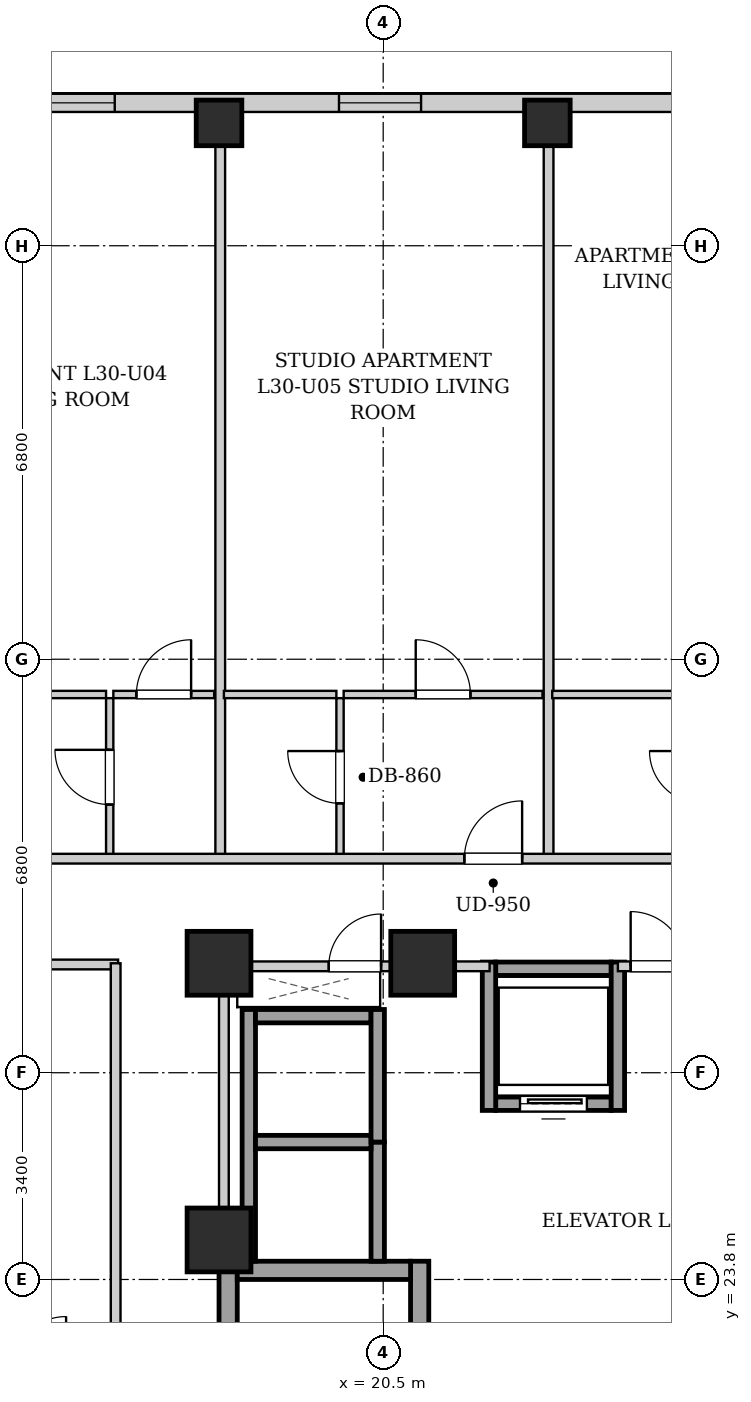
"""IFC4 building model, lengths in metres.
Left out: names, types, materials, properties, quantities, classifications, styles, units other than length and angle.
Written with IfcOpenShell. Run it as: python <this file> out.ifc"""

import sys

from ifc_helpers import new_model, si_unit, direction, frame, frame_2d, origin, origin_2d, place, context, subcontext, project, spatial, rectangle, extrude, element, fill, save


model = new_model("IFC4")
c1 = context("Model", 3, precision=1e-05, world=origin(), true_north=direction((0.0, 1.0)))
c2 = subcontext(c1, "Body", "Model", "MODEL_VIEW")
j1 = project(units=[si_unit("LENGTHUNIT", "METRE"), si_unit("PLANEANGLEUNIT", "RADIAN")], contexts=[c1])
p1 = place(None, origin())
s1 = spatial("IfcSite", under=j1, at=p1, CompositionType="ELEMENT")
p2 = place(p1, origin())
s2 = spatial("IfcBuilding", under=s1, at=p2, CompositionType="ELEMENT")
p3 = place(p2, frame((0.0, 0.0, 107.1)))
s3 = spatial("IfcBuildingStorey", under=s2, at=p3, CompositionType="ELEMENT", Elevation=107.1)
for number, where, z_axis, x_axis in (
    (1, (17.8, 42.82, 0.0), (0.0, 0.0, 1.0), (1.0, 0.0, 0.0)),
    (2, (23.2, 42.82, 0.0), (0.0, 0.0, 1.0), (1.0, 0.0, 0.0)),
):
    element("IfcColumn", number, at=place(p3, frame(where, z_axis=z_axis, x_axis=x_axis)), inside=s3, PredefinedType="COLUMN", context=c2, shape_type="SweptSolid", body=[
        extrude(rectangle(XDim=0.75, YDim=0.75, at=origin_2d()), origin(), (0.0, 0.0, 1.0), 3.2),
    ])
for number, where, z_axis, x_axis in (
    (3, (17.8, 29.0, 0.0), (0.0, 0.0, 1.0), (1.0, 0.0, 0.0)),
    (4, (21.15, 29.0, 0.0), (0.0, 0.0, 1.0), (1.0, 0.0, 0.0)),
    (5, (17.8, 24.45, 0.0), (0.0, 0.0, 1.0), (1.0, 0.0, 0.0)),
):
    element("IfcColumn", number, at=place(p3, frame(where, z_axis=z_axis, x_axis=x_axis)), inside=s3, PredefinedType="COLUMN", context=c2, shape_type="SweptSolid", body=[
        extrude(rectangle(XDim=1.05, YDim=1.05, at=origin_2d()), origin(), (0.0, 0.0, 1.0), 3.2),
    ])
p4 = place(p3, frame((10.0, 43.15, 0.0), z_axis=(0.0, 0.0, 1.0), x_axis=(1.0, 0.0, 0.0)))
e6 = element("IfcWall", 6, at=p4, inside=s3, PredefinedType="SOLIDWALL", context=c2, shape_type="SweptSolid", body=[
    extrude(rectangle(XDim=23.15, YDim=0.3, at=frame_2d((11.575, 0.0))), origin(), (0.0, 0.0, 1.0), 2.94),
])
p5 = place(p4, frame((4.735, 0.0, 0.55)))
e7 = element("IfcOpeningElement", 7, at=p5, cuts=e6, PredefinedType="OPENING", context=c2, shape_type="SweptSolid", body=[
    extrude(rectangle(XDim=1.35, YDim=1.2, at=frame_2d((0.675, 0.6))), frame((0.0, 0.16, 0.0), z_axis=(0.0, -1.0, 0.0), x_axis=(1.0, 0.0, 0.0)), (0.0, 0.0, 1.0), 0.32),
])
p6 = place(p4, frame((1.27, 0.0, 0.55)))
e8 = element("IfcOpeningElement", 8, at=p6, cuts=e6, PredefinedType="OPENING", context=c2, shape_type="SweptSolid", body=[
    extrude(rectangle(XDim=1.35, YDim=1.2, at=frame_2d((0.675, 0.6))), frame((0.0, 0.16, 0.0), z_axis=(0.0, -1.0, 0.0), x_axis=(1.0, 0.0, 0.0)), (0.0, 0.0, 1.0), 0.32),
])
p7 = place(p4, frame((9.773, 0.0, 0.55)))
e9 = element("IfcOpeningElement", 9, at=p7, cuts=e6, PredefinedType="OPENING", context=c2, shape_type="SweptSolid", body=[
    extrude(rectangle(XDim=1.35, YDim=1.2, at=frame_2d((0.675, 0.6))), frame((0.0, 0.16, 0.0), z_axis=(0.0, -1.0, 0.0), x_axis=(1.0, 0.0, 0.0)), (0.0, 0.0, 1.0), 0.32),
])
p8 = place(p4, frame((17.5, 0.0, 0.55)))
e10 = element("IfcOpeningElement", 10, at=p8, cuts=e6, PredefinedType="OPENING", context=c2, shape_type="SweptSolid", body=[
    extrude(rectangle(XDim=0.85, YDim=1.2, at=frame_2d((0.425, 0.6))), frame((0.0, 0.16, 0.0), z_axis=(0.0, -1.0, 0.0), x_axis=(1.0, 0.0, 0.0)), (0.0, 0.0, 1.0), 0.32),
])
p9 = place(p4, frame((19.393, 0.0, 0.55)))
e11 = element("IfcOpeningElement", 11, at=p9, cuts=e6, PredefinedType="OPENING", context=c2, shape_type="SweptSolid", body=[
    extrude(rectangle(XDim=1.35, YDim=1.2, at=frame_2d((0.675, 0.6))), frame((0.0, 0.16, 0.0), z_axis=(0.0, -1.0, 0.0), x_axis=(1.0, 0.0, 0.0)), (0.0, 0.0, 1.0), 0.32),
])
for number, where, z_axis, x_axis in (
    (12, (17.95, 15.1, 0.0), (0.0, 0.0, 1.0), (0.0, 1.0, 0.0)),
    (13, (21.1, 15.1, 0.0), (0.0, 0.0, 1.0), (0.0, 1.0, 0.0)),
):
    element("IfcWall", number, at=place(p3, frame(where, z_axis=z_axis, x_axis=x_axis)), inside=s3, PredefinedType="SHEAR", context=c2, shape_type="SweptSolid", body=[
        extrude(rectangle(XDim=9.0, YDim=0.3, at=frame_2d((4.5, 0.0))), origin(), (0.0, 0.0, 1.0), 2.94),
    ])
p10 = place(p3, frame((18.1, 23.95, 0.0), z_axis=(0.0, 0.0, 1.0), x_axis=(1.0, 0.0, 0.0)))
e14 = element("IfcWall", 14, at=p10, inside=s3, PredefinedType="SHEAR", context=c2, shape_type="SweptSolid", body=[
    extrude(rectangle(XDim=2.85, YDim=0.3, at=frame_2d((1.425, 0.0))), origin(), (0.0, 0.0, 1.0), 2.94),
])
p11 = place(p3, frame((22.35, 26.69, 0.0), z_axis=(0.0, 0.0, 1.0), x_axis=(1.0, 0.0, 0.0)))
e15 = element("IfcWall", 15, at=p11, inside=s3, PredefinedType="SHEAR", context=c2, shape_type="SweptSolid", body=[
    extrude(rectangle(XDim=1.9, YDim=0.22, at=frame_2d((0.95, 0.0))), origin(), (0.0, 0.0, 1.0), 2.94),
])
p12 = place(p11, frame((0.4, 0.0, 0.0)))
e16 = element("IfcOpeningElement", 16, at=p12, cuts=e15, PredefinedType="OPENING", context=c2, shape_type="SweptSolid", body=[
    extrude(rectangle(XDim=1.1, YDim=2.15, at=frame_2d((0.55, 1.075))), frame((0.0, 0.12, 0.0), z_axis=(0.0, -1.0, 0.0), x_axis=(1.0, 0.0, 0.0)), (0.0, 0.0, 1.0), 0.24),
])
p13 = place(p3, frame((22.35, 28.91, 0.0), z_axis=(0.0, 0.0, 1.0), x_axis=(1.0, 0.0, 0.0)))
e17 = element("IfcWall", 17, at=p13, inside=s3, PredefinedType="SHEAR", context=c2, shape_type="SweptSolid", body=[
    extrude(rectangle(XDim=1.9, YDim=0.22, at=frame_2d((0.95, 0.0))), origin(), (0.0, 0.0, 1.0), 2.94),
])
for number, where, z_axis, x_axis in (
    (18, (22.24, 26.58, 0.0), (0.0, 0.0, 1.0), (0.0, 1.0, 0.0)),
    (19, (24.36, 26.58, 0.0), (0.0, 0.0, 1.0), (0.0, 1.0, 0.0)),
):
    element("IfcWall", number, at=place(p3, frame(where, z_axis=z_axis, x_axis=x_axis)), inside=s3, PredefinedType="SHEAR", context=c2, shape_type="SweptSolid", body=[
        extrude(rectangle(XDim=2.44, YDim=0.22, at=frame_2d((1.22, 0.0))), origin(), (0.0, 0.0, 1.0), 2.94),
    ])
p14 = place(p3, frame((18.29, 24.1, 0.0), z_axis=(0.0, 0.0, 1.0), x_axis=(0.0, 1.0, 0.0)))
e20 = element("IfcWall", 20, at=p14, inside=s3, PredefinedType="SHEAR", context=c2, shape_type="SweptSolid", body=[
    extrude(rectangle(XDim=4.14, YDim=0.22, at=frame_2d((2.07, 0.0))), origin(), (0.0, 0.0, 1.0), 2.94),
])
p15 = place(p3, frame((20.41, 24.1, 0.0), z_axis=(0.0, 0.0, 1.0), x_axis=(0.0, 1.0, 0.0)))
e21 = element("IfcWall", 21, at=p15, inside=s3, PredefinedType="SHEAR", context=c2, shape_type="SweptSolid", body=[
    extrude(rectangle(XDim=1.96, YDim=0.22, at=frame_2d((0.98, 0.0))), origin(), (0.0, 0.0, 1.0), 2.94),
])
for number, where, z_axis, x_axis in (
    (22, (18.4, 26.06, 0.0), (0.0, 0.0, 1.0), (1.0, 0.0, 0.0)),
    (23, (18.4, 28.13, 0.0), (0.0, 0.0, 1.0), (1.0, 0.0, 0.0)),
):
    element("IfcWall", number, at=place(p3, frame(where, z_axis=z_axis, x_axis=x_axis)), inside=s3, PredefinedType="SHEAR", context=c2, shape_type="SweptSolid", body=[
        extrude(rectangle(XDim=1.9, YDim=0.22, at=frame_2d((0.95, 0.0))), origin(), (0.0, 0.0, 1.0), 2.94),
    ])
p16 = place(p3, frame((20.41, 26.06, 0.0), z_axis=(0.0, 0.0, 1.0), x_axis=(0.0, 1.0, 0.0)))
e24 = element("IfcWall", 24, at=p16, inside=s3, PredefinedType="SHEAR", context=c2, shape_type="SweptSolid", body=[
    extrude(rectangle(XDim=2.18, YDim=0.22, at=frame_2d((1.09, 0.0))), origin(), (0.0, 0.0, 1.0), 2.94),
])
p17 = place(p3, frame((17.88, 24.12, 0.0), z_axis=(0.0, 0.0, 1.0), x_axis=(0.0, 1.0, 0.0)))
e25 = element("IfcWall", 25, at=p17, inside=s3, PredefinedType="PARTITIONING", context=c2, shape_type="SweptSolid", body=[
    extrude(rectangle(XDim=4.76, YDim=0.16, at=frame_2d((2.38, 0.0))), origin(), (0.0, 0.0, 1.0), 2.275),
])
p18 = place(p3, frame((24.36, 28.95, 0.0), z_axis=(0.0, 0.0, 1.0), x_axis=(1.0, 0.0, 0.0)))
e26 = element("IfcWall", 26, at=p18, inside=s3, PredefinedType="PARTITIONING", context=c2, shape_type="SweptSolid", body=[
    extrude(rectangle(XDim=1.32, YDim=0.16, at=frame_2d((0.66, 0.0))), origin(), (0.0, 0.0, 1.0), 2.313),
])
p19 = place(p18, frame((0.21, 0.0, 0.0)))
e27 = element("IfcOpeningElement", 27, at=p19, cuts=e26, PredefinedType="OPENING", context=c2, shape_type="SweptSolid", body=[
    extrude(rectangle(XDim=0.9, YDim=2.05, at=frame_2d((0.45, 1.025))), frame((0.0, 0.09, 0.0), z_axis=(0.0, -1.0, 0.0), x_axis=(1.0, 0.0, 0.0)), (0.0, 0.0, 1.0), 0.18),
])
p20 = place(p3, frame((17.96, 28.95, 0.0), z_axis=(0.0, 0.0, 1.0), x_axis=(1.0, 0.0, 0.0)))
e28 = element("IfcWall", 28, at=p20, inside=s3, PredefinedType="PARTITIONING", context=c2, shape_type="SweptSolid", body=[
    extrude(rectangle(XDim=4.29, YDim=0.16, at=frame_2d((2.145, 0.0))), origin(), (0.0, 0.0, 1.0), 2.313),
])
p21 = place(p20, frame((1.645, 0.0, 0.0)))
e29 = element("IfcOpeningElement", 29, at=p21, cuts=e28, PredefinedType="OPENING", context=c2, shape_type="SweptSolid", body=[
    extrude(rectangle(XDim=0.86, YDim=2.05, at=frame_2d((0.43, 1.025))), frame((0.0, 0.09, 0.0), z_axis=(0.0, -1.0, 0.0), x_axis=(1.0, 0.0, 0.0)), (0.0, 0.0, 1.0), 0.18),
])
p22 = place(p3, frame((7.78, 28.98, 0.0), z_axis=(0.0, 0.0, 1.0), x_axis=(1.0, 0.0, 0.0)))
e30 = element("IfcWall", 30, at=p22, inside=s3, PredefinedType="PARTITIONING", context=c2, shape_type="SweptSolid", body=[
    extrude(rectangle(XDim=8.36, YDim=0.16, at=frame_2d((4.18, 0.0))), origin(), (0.0, 0.0, 1.0), 2.313),
])
p23 = place(p3, frame((16.002, 30.76, 0.0), z_axis=(0.0, 0.0, 1.0), x_axis=(0.0, 1.0, 0.0)))
e31 = element("IfcWall", 31, at=p23, inside=s3, PredefinedType="PARTITIONING", context=c2, shape_type="SweptSolid", body=[
    extrude(rectangle(XDim=2.6, YDim=0.12, at=frame_2d((1.3, 0.0))), origin(), (0.0, 0.0, 1.0), 2.94),
])
p24 = place(p23, frame((0.85, 0.0, 0.0)))
e32 = element("IfcOpeningElement", 32, at=p24, cuts=e31, PredefinedType="OPENING", context=c2, shape_type="SweptSolid", body=[
    extrude(rectangle(XDim=0.9, YDim=2.05, at=frame_2d((0.45, 1.025))), frame((0.0, 0.07, 0.0), z_axis=(0.0, -1.0, 0.0), x_axis=(1.0, 0.0, 0.0)), (0.0, 0.0, 1.0), 0.14),
])
p25 = place(p3, frame((12.492, 33.42, 0.0), z_axis=(0.0, 0.0, 1.0), x_axis=(1.0, 0.0, 0.0)))
e33 = element("IfcWall", 33, at=p25, inside=s3, PredefinedType="PARTITIONING", context=c2, shape_type="SweptSolid", body=[
    extrude(rectangle(XDim=3.45, YDim=0.12, at=frame_2d((1.725, 0.0))), origin(), (0.0, 0.0, 1.0), 2.94),
])
p26 = place(p25, frame((1.275, 0.0, 0.0)))
e34 = element("IfcOpeningElement", 34, at=p26, cuts=e33, PredefinedType="OPENING", context=c2, shape_type="SweptSolid", body=[
    extrude(rectangle(XDim=0.9, YDim=2.05, at=frame_2d((0.45, 1.025))), frame((0.0, 0.07, 0.0), z_axis=(0.0, -1.0, 0.0), x_axis=(1.0, 0.0, 0.0)), (0.0, 0.0, 1.0), 0.14),
])
p27 = place(p3, frame((16.062, 33.42, 0.0), z_axis=(0.0, 0.0, 1.0), x_axis=(1.0, 0.0, 0.0)))
e35 = element("IfcWall", 35, at=p27, inside=s3, PredefinedType="PARTITIONING", context=c2, shape_type="SweptSolid", body=[
    extrude(rectangle(XDim=1.658, YDim=0.12, at=frame_2d((0.829, 0.0))), origin(), (0.0, 0.0, 1.0), 2.94),
])
p28 = place(p27, frame((0.379, 0.0, 0.0)))
e36 = element("IfcOpeningElement", 36, at=p28, cuts=e35, PredefinedType="OPENING", context=c2, shape_type="SweptSolid", body=[
    extrude(rectangle(XDim=0.9, YDim=2.05, at=frame_2d((0.45, 1.025))), frame((0.0, 0.07, 0.0), z_axis=(0.0, -1.0, 0.0), x_axis=(1.0, 0.0, 0.0)), (0.0, 0.0, 1.0), 0.14),
])
p29 = place(p3, frame((17.82, 30.76, 0.0), z_axis=(0.0, 0.0, 1.0), x_axis=(0.0, 1.0, 0.0)))
e37 = element("IfcWall", 37, at=p29, inside=s3, PredefinedType="PARTITIONING", context=c2, shape_type="SweptSolid", body=[
    extrude(rectangle(XDim=12.26, YDim=0.16, at=frame_2d((6.13, 0.0))), origin(), (0.0, 0.0, 1.0), 2.313),
])
p30 = place(p3, frame((19.79, 30.76, 0.0), z_axis=(0.0, 0.0, 1.0), x_axis=(0.0, 1.0, 0.0)))
e38 = element("IfcWall", 38, at=p30, inside=s3, PredefinedType="PARTITIONING", context=c2, shape_type="SweptSolid", body=[
    extrude(rectangle(XDim=2.6, YDim=0.12, at=frame_2d((1.3, 0.0))), origin(), (0.0, 0.0, 1.0), 2.94),
])
p31 = place(p30, frame((0.87, 0.0, 0.0)))
e39 = element("IfcOpeningElement", 39, at=p31, cuts=e38, PredefinedType="OPENING", context=c2, shape_type="SweptSolid", body=[
    extrude(rectangle(XDim=0.86, YDim=2.05, at=frame_2d((0.43, 1.025))), frame((0.0, 0.07, 0.0), z_axis=(0.0, -1.0, 0.0), x_axis=(1.0, 0.0, 0.0)), (0.0, 0.0, 1.0), 0.14),
])
p32 = place(p3, frame((17.88, 33.42, 0.0), z_axis=(0.0, 0.0, 1.0), x_axis=(1.0, 0.0, 0.0)))
e40 = element("IfcWall", 40, at=p32, inside=s3, PredefinedType="PARTITIONING", context=c2, shape_type="SweptSolid", body=[
    extrude(rectangle(XDim=1.85, YDim=0.12, at=frame_2d((0.925, 0.0))), origin(), (0.0, 0.0, 1.0), 2.94),
])
p33 = place(p3, frame((19.85, 33.42, 0.0), z_axis=(0.0, 0.0, 1.0), x_axis=(1.0, 0.0, 0.0)))
e41 = element("IfcWall", 41, at=p33, inside=s3, PredefinedType="PARTITIONING", context=c2, shape_type="SweptSolid", body=[
    extrude(rectangle(XDim=3.27, YDim=0.12, at=frame_2d((1.635, 0.0))), origin(), (0.0, 0.0, 1.0), 2.94),
])
p34 = place(p33, frame((1.185, 0.0, 0.0)))
e42 = element("IfcOpeningElement", 42, at=p34, cuts=e41, PredefinedType="OPENING", context=c2, shape_type="SweptSolid", body=[
    extrude(rectangle(XDim=0.9, YDim=2.05, at=frame_2d((0.45, 1.025))), frame((0.0, 0.07, 0.0), z_axis=(0.0, -1.0, 0.0), x_axis=(1.0, 0.0, 0.0)), (0.0, 0.0, 1.0), 0.14),
])
p35 = place(p3, frame((23.22, 30.76, 0.0), z_axis=(0.0, 0.0, 1.0), x_axis=(0.0, 1.0, 0.0)))
e43 = element("IfcWall", 43, at=p35, inside=s3, PredefinedType="PARTITIONING", context=c2, shape_type="SweptSolid", body=[
    extrude(rectangle(XDim=12.26, YDim=0.16, at=frame_2d((6.13, 0.0))), origin(), (0.0, 0.0, 1.0), 2.94),
])
p36 = place(p3, frame((23.28, 33.42, 0.0), z_axis=(0.0, 0.0, 1.0), x_axis=(1.0, 0.0, 0.0)))
e44 = element("IfcWall", 44, at=p36, inside=s3, PredefinedType="PARTITIONING", context=c2, shape_type="SweptSolid", body=[
    extrude(rectangle(XDim=2.4, YDim=0.12, at=frame_2d((1.2, 0.0))), origin(), (0.0, 0.0, 1.0), 2.94),
])
p37 = place(p3, frame((10.05, 30.72, 0.0), z_axis=(0.0, 0.0, 1.0), x_axis=(1.0, 0.0, 0.0)))
e45 = element("IfcWall", 45, at=p37, inside=s3, PredefinedType="PARTITIONING", context=c2, shape_type="SweptSolid", body=[
    extrude(rectangle(XDim=30.8, YDim=0.16, at=frame_2d((15.4, 0.0))), origin(), (0.0, 0.0, 1.0), 2.94),
])
p38 = place(p37, frame((3.692, 0.0, 0.0)))
e46 = element("IfcOpeningElement", 46, at=p38, cuts=e45, PredefinedType="OPENING", context=c2, shape_type="SweptSolid", body=[
    extrude(rectangle(XDim=0.95, YDim=2.1, at=frame_2d((0.475, 1.05))), frame((0.0, 0.09, 0.0), z_axis=(0.0, -1.0, 0.0), x_axis=(1.0, 0.0, 0.0)), (0.0, 0.0, 1.0), 0.18),
])
p39 = place(p37, frame((11.785, 0.0, 0.0)))
e47 = element("IfcOpeningElement", 47, at=p39, cuts=e45, PredefinedType="OPENING", context=c2, shape_type="SweptSolid", body=[
    extrude(rectangle(XDim=0.95, YDim=2.1, at=frame_2d((0.475, 1.05))), frame((0.0, 0.09, 0.0), z_axis=(0.0, -1.0, 0.0), x_axis=(1.0, 0.0, 0.0)), (0.0, 0.0, 1.0), 0.18),
])
p40 = place(p37, frame((17.235, 0.0, 0.0)))
e48 = element("IfcOpeningElement", 48, at=p40, cuts=e45, PredefinedType="OPENING", context=c2, shape_type="SweptSolid", body=[
    extrude(rectangle(XDim=0.95, YDim=2.1, at=frame_2d((0.475, 1.05))), frame((0.0, 0.09, 0.0), z_axis=(0.0, -1.0, 0.0), x_axis=(1.0, 0.0, 0.0)), (0.0, 0.0, 1.0), 0.18),
])
p41 = place(p37, frame((28.64, 0.0, 0.0)))
e49 = element("IfcOpeningElement", 49, at=p41, cuts=e45, PredefinedType="OPENING", context=c2, shape_type="SweptSolid", body=[
    extrude(rectangle(XDim=0.95, YDim=2.1, at=frame_2d((0.475, 1.05))), frame((0.0, 0.09, 0.0), z_axis=(0.0, -1.0, 0.0), x_axis=(1.0, 0.0, 0.0)), (0.0, 0.0, 1.0), 0.18),
])
p42 = place(p3, frame((16.1, 15.07, 0.0), z_axis=(0.0, 0.0, 1.0), x_axis=(0.0, 1.0, 0.0)))
e50 = element("IfcWall", 50, at=p42, inside=s3, PredefinedType="PARTITIONING", context=c2, shape_type="SweptSolid", body=[
    extrude(rectangle(XDim=13.93, YDim=0.16, at=frame_2d((6.965, 0.0))), origin(), (0.0, 0.0, 1.0), 2.94),
])
p43 = place(p42, frame((4.385, 0.0, 0.0)))
e51 = element("IfcOpeningElement", 51, at=p43, cuts=e50, PredefinedType="OPENING", context=c2, shape_type="SweptSolid", body=[
    extrude(rectangle(XDim=0.95, YDim=2.1, at=frame_2d((0.475, 1.05))), frame((0.0, 0.09, 0.0), z_axis=(0.0, -1.0, 0.0), x_axis=(1.0, 0.0, 0.0)), (0.0, 0.0, 1.0), 0.18),
])
p44 = place(p12, origin())
e52 = element("IfcDoor", 52, at=p44, inside=s3, OperationType="SLIDING_TO_LEFT", PredefinedType="DOOR", context=c2, shape_type="SweptSolid", body=[
    extrude(rectangle(XDim=1.1, YDim=2.15, at=frame_2d((0.55, 1.075))), frame((0.0, 0.025, 0.0), z_axis=(0.0, -1.0, 0.0), x_axis=(1.0, 0.0, 0.0)), (0.0, 0.0, 1.0), 0.05),
])
fill(e16, e52)
p45 = place(p19, origin())
e53 = element("IfcDoor", 53, at=p45, inside=s3, OperationType="SINGLE_SWING_LEFT", PredefinedType="DOOR", context=c2, shape_type="SweptSolid", body=[
    extrude(rectangle(XDim=0.9, YDim=2.05, at=frame_2d((0.45, 1.025))), frame((0.0, 0.025, 0.0), z_axis=(0.0, -1.0, 0.0), x_axis=(1.0, 0.0, 0.0)), (0.0, 0.0, 1.0), 0.05),
])
fill(e27, e53)
p46 = place(p21, origin())
e54 = element("IfcDoor", 54, at=p46, inside=s3, OperationType="SINGLE_SWING_RIGHT", PredefinedType="DOOR", context=c2, shape_type="SweptSolid", body=[
    extrude(rectangle(XDim=0.86, YDim=2.05, at=frame_2d((0.43, 1.025))), frame((0.0, 0.025, 0.0), z_axis=(0.0, -1.0, 0.0), x_axis=(1.0, 0.0, 0.0)), (0.0, 0.0, 1.0), 0.05),
])
fill(e29, e54)
p47 = place(p24, origin())
e55 = element("IfcDoor", 55, at=p47, inside=s3, OperationType="SINGLE_SWING_RIGHT", PredefinedType="DOOR", context=c2, shape_type="SweptSolid", body=[
    extrude(rectangle(XDim=0.9, YDim=2.05, at=frame_2d((0.45, 1.025))), frame((0.0, 0.025, 0.0), z_axis=(0.0, -1.0, 0.0), x_axis=(1.0, 0.0, 0.0)), (0.0, 0.0, 1.0), 0.05),
])
fill(e32, e55)
p48 = place(p28, origin())
e56 = element("IfcDoor", 56, at=p48, inside=s3, OperationType="SINGLE_SWING_RIGHT", PredefinedType="DOOR", context=c2, shape_type="SweptSolid", body=[
    extrude(rectangle(XDim=0.9, YDim=2.05, at=frame_2d((0.45, 1.025))), frame((0.0, 0.025, 0.0), z_axis=(0.0, -1.0, 0.0), x_axis=(1.0, 0.0, 0.0)), (0.0, 0.0, 1.0), 0.05),
])
fill(e36, e56)
p49 = place(p31, origin())
e57 = element("IfcDoor", 57, at=p49, inside=s3, OperationType="SINGLE_SWING_RIGHT", PredefinedType="DOOR", context=c2, shape_type="SweptSolid", body=[
    extrude(rectangle(XDim=0.86, YDim=2.05, at=frame_2d((0.43, 1.025))), frame((0.0, 0.025, 0.0), z_axis=(0.0, -1.0, 0.0), x_axis=(1.0, 0.0, 0.0)), (0.0, 0.0, 1.0), 0.05),
])
fill(e39, e57)
p50 = place(p34, origin())
e58 = element("IfcDoor", 58, at=p50, inside=s3, OperationType="SINGLE_SWING_LEFT", PredefinedType="DOOR", context=c2, shape_type="SweptSolid", body=[
    extrude(rectangle(XDim=0.9, YDim=2.05, at=frame_2d((0.45, 1.025))), frame((0.0, 0.025, 0.0), z_axis=(0.0, -1.0, 0.0), x_axis=(1.0, 0.0, 0.0)), (0.0, 0.0, 1.0), 0.05),
])
fill(e42, e58)
p51 = place(p39, origin())
e59 = element("IfcDoor", 59, at=p51, inside=s3, OperationType="SINGLE_SWING_RIGHT", PredefinedType="DOOR", context=c2, shape_type="SweptSolid", body=[
    extrude(rectangle(XDim=0.95, YDim=2.1, at=frame_2d((0.475, 1.05))), frame((0.0, 0.025, 0.0), z_axis=(0.0, -1.0, 0.0), x_axis=(1.0, 0.0, 0.0)), (0.0, 0.0, 1.0), 0.05),
])
fill(e47, e59)
p52 = place(p5, origin())
e60 = element("IfcWindow", 60, at=p52, inside=s3, PartitioningType="SINGLE_PANEL", PredefinedType="WINDOW", context=c2, shape_type="SweptSolid", body=[
    extrude(rectangle(XDim=1.35, YDim=1.2, at=frame_2d((0.675, 0.6))), frame((0.0, 0.03, 0.0), z_axis=(0.0, -1.0, 0.0), x_axis=(1.0, 0.0, 0.0)), (0.0, 0.0, 1.0), 0.06),
])
fill(e7, e60)
p53 = place(p7, origin())
e61 = element("IfcWindow", 61, at=p53, inside=s3, PartitioningType="SINGLE_PANEL", PredefinedType="WINDOW", context=c2, shape_type="SweptSolid", body=[
    extrude(rectangle(XDim=1.35, YDim=1.2, at=frame_2d((0.675, 0.6))), frame((0.0, 0.03, 0.0), z_axis=(0.0, -1.0, 0.0), x_axis=(1.0, 0.0, 0.0)), (0.0, 0.0, 1.0), 0.06),
])
fill(e9, e61)
save(model, sys.argv[1])
